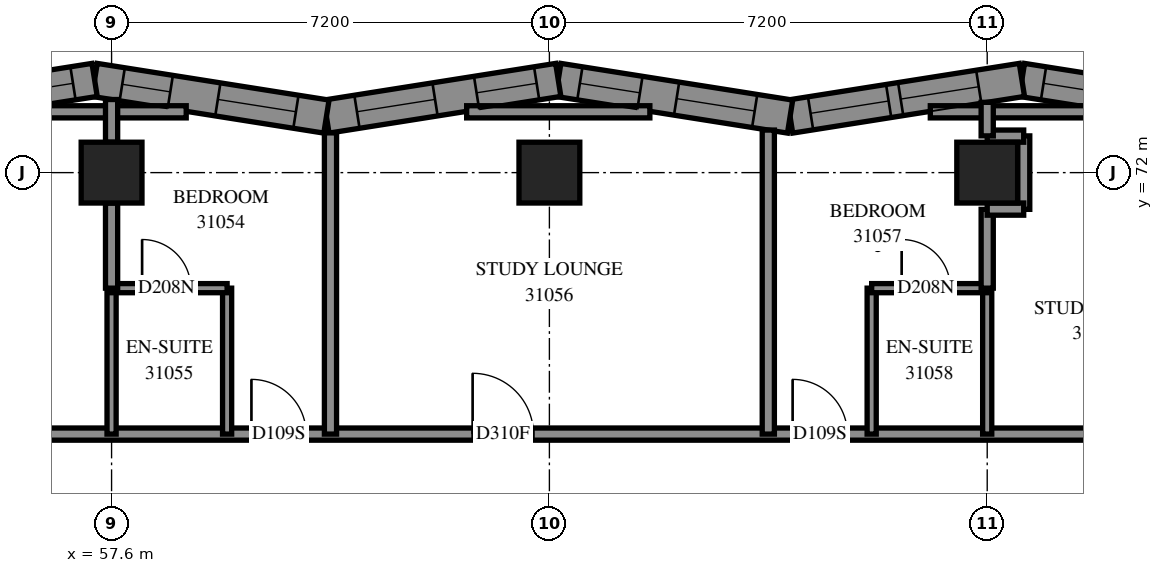
"""IFC4 building model, lengths in metres.
Left out: names, types, materials, properties, quantities, classifications, styles, units other than length and angle.
Written with IfcOpenShell. Run it as: python <this file> out.ifc"""

import sys

from ifc_helpers import new_model, si_unit, direction, frame, frame_2d, origin, origin_2d, place, context, subcontext, project, spatial, polyline, rectangle, outline, extrude, element, fill, save


model = new_model("IFC4")
c1 = context("Model", 3, precision=1e-05, world=origin(), true_north=direction((0.0, 1.0)))
c2 = subcontext(c1, "Body", "Model", "MODEL_VIEW")
j1 = project(units=[si_unit("LENGTHUNIT", "METRE"), si_unit("PLANEANGLEUNIT", "RADIAN")], contexts=[c1])
p1 = place(None, origin())
s1 = spatial("IfcSite", under=j1, at=p1, CompositionType="ELEMENT")
p2 = place(p1, origin())
s2 = spatial("IfcBuilding", under=s1, at=p2, CompositionType="ELEMENT")
p3 = place(p2, frame((0.0, 0.0, 115.2)))
s3 = spatial("IfcBuildingStorey", under=s2, at=p3, CompositionType="ELEMENT", Elevation=115.2)
for number, where, z_axis, x_axis in (
    (1, (57.6, 72.0, 0.0), (0.0, 0.0, 1.0), (1.0, 0.0, 0.0)),
    (2, (64.8, 72.0, 0.0), (0.0, 0.0, 1.0), (1.0, 0.0, 0.0)),
    (3, (72.0, 72.0, 0.0), (0.0, 0.0, 1.0), (1.0, 0.0, 0.0)),
):
    element("IfcColumn", number, at=place(p3, frame(where, z_axis=z_axis, x_axis=x_axis)), inside=s3, PredefinedType="COLUMN", context=c2, shape_type="SweptSolid", body=[
        extrude(rectangle(XDim=1.0, YDim=1.0, at=origin_2d()), origin(), (0.0, 0.0, 1.0), 3.1),
    ])
p4 = place(p3, frame((76.404, 72.918, 0.0), z_axis=(0.0, 0.0, 1.0), x_axis=(-0.9877221932, 0.1562205785, 0.0)))
e4 = element("IfcWall", 4, at=p4, inside=s3, PredefinedType="SOLIDWALL", context=c2, shape_type="SweptSolid", body=[
    extrude(outline(polyline([(0.065, -0.275), (3.925, -0.275), (3.838, 0.275), (-0.065, 0.275), (0.065, -0.275)])), origin(), (0.0, 0.0, 1.0), 3.1),
])
p5 = place(p4, frame((0.88, 0.0, 0.45)))
e5 = element("IfcOpeningElement", 5, at=p5, cuts=e4, PredefinedType="OPENING", context=c2, shape_type="SweptSolid", body=[
    extrude(rectangle(XDim=1.0, YDim=2.5, at=frame_2d((0.5, 1.25))), frame((0.0, 0.285, 0.0), z_axis=(0.0, -1.0, 0.0), x_axis=(1.0, 0.0, 0.0)), (0.0, 0.0, 1.0), 0.57),
])
p6 = place(p4, frame((2.521, 0.0, 0.45)))
e6 = element("IfcOpeningElement", 6, at=p6, cuts=e4, PredefinedType="OPENING", context=c2, shape_type="SweptSolid", body=[
    extrude(rectangle(XDim=1.0, YDim=2.5, at=frame_2d((0.5, 1.25))), frame((0.0, 0.285, 0.0), z_axis=(0.0, -1.0, 0.0), x_axis=(1.0, 0.0, 0.0)), (0.0, 0.0, 1.0), 0.57),
])
p7 = place(p3, frame((72.571, 73.525, 0.0), z_axis=(0.0, 0.0, 1.0), x_axis=(-0.9877213372, -0.1562259905, 0.0)))
e7 = element("IfcWall", 7, at=p7, inside=s3, PredefinedType="SOLIDWALL", context=c2, shape_type="SweptSolid", body=[
    extrude(outline(polyline([(-0.043, -0.275), (3.816, -0.275), (3.903, 0.275), (0.043, 0.275), (-0.043, -0.275)])), origin(), (0.0, 0.0, 1.0), 3.1),
])
p8 = place(p7, frame((0.719, 0.0, 0.5)))
e8 = element("IfcOpeningElement", 8, at=p8, cuts=e7, PredefinedType="OPENING", context=c2, shape_type="SweptSolid", body=[
    extrude(rectangle(XDim=1.3, YDim=2.45, at=frame_2d((0.65, 1.225))), frame((0.0, 0.285, 0.0), z_axis=(0.0, -1.0, 0.0), x_axis=(1.0, 0.0, 0.0)), (0.0, 0.0, 1.0), 0.57),
])
p9 = place(p7, frame((2.219, 0.0, 0.5)))
e9 = element("IfcOpeningElement", 9, at=p9, cuts=e7, PredefinedType="OPENING", context=c2, shape_type="SweptSolid", body=[
    extrude(rectangle(XDim=1.3, YDim=2.45, at=frame_2d((0.65, 1.225))), frame((0.0, 0.285, 0.0), z_axis=(0.0, -1.0, 0.0), x_axis=(1.0, 0.0, 0.0)), (0.0, 0.0, 1.0), 0.57),
])
p10 = place(p3, frame((68.758, 72.922, 0.0), z_axis=(0.0, 0.0, 1.0), x_axis=(-0.9877213372, 0.1562259905, 0.0)))
e10 = element("IfcWall", 10, at=p10, inside=s3, PredefinedType="SOLIDWALL", context=c2, shape_type="SweptSolid", body=[
    extrude(outline(polyline([(0.043, -0.275), (3.903, -0.275), (3.816, 0.275), (-0.043, 0.275), (0.043, -0.275)])), origin(), (0.0, 0.0, 1.0), 3.1),
])
p11 = place(p10, frame((0.59, 0.0, 0.5)))
e11 = element("IfcOpeningElement", 11, at=p11, cuts=e10, PredefinedType="OPENING", context=c2, shape_type="SweptSolid", body=[
    extrude(rectangle(XDim=1.3, YDim=2.45, at=frame_2d((0.65, 1.225))), frame((0.0, 0.285, 0.0), z_axis=(0.0, -1.0, 0.0), x_axis=(1.0, 0.0, 0.0)), (0.0, 0.0, 1.0), 0.57),
])
p12 = place(p10, frame((2.5, 0.0, 0.45)))
e12 = element("IfcOpeningElement", 12, at=p12, cuts=e10, PredefinedType="OPENING", context=c2, shape_type="SweptSolid", body=[
    extrude(rectangle(XDim=1.0, YDim=2.5, at=frame_2d((0.5, 1.25))), frame((0.0, 0.285, 0.0), z_axis=(0.0, -1.0, 0.0), x_axis=(1.0, 0.0, 0.0)), (0.0, 0.0, 1.0), 0.57),
])
p13 = place(p3, frame((64.946, 73.525, 0.0), z_axis=(0.0, 0.0, 1.0), x_axis=(-0.9877213372, -0.1562259905, 0.0)))
e13 = element("IfcWall", 13, at=p13, inside=s3, PredefinedType="SOLIDWALL", context=c2, shape_type="SweptSolid", body=[
    extrude(outline(polyline([(-0.043, -0.275), (3.816, -0.275), (3.903, 0.275), (0.043, 0.275), (-0.043, -0.275)])), origin(), (0.0, 0.0, 1.0), 3.1),
])
p14 = place(p13, frame((2.052, 0.0, 0.5)))
e14 = element("IfcOpeningElement", 14, at=p14, cuts=e13, PredefinedType="OPENING", context=c2, shape_type="SweptSolid", body=[
    extrude(rectangle(XDim=1.3, YDim=2.45, at=frame_2d((0.65, 1.225))), frame((0.0, 0.285, 0.0), z_axis=(0.0, -1.0, 0.0), x_axis=(1.0, 0.0, 0.0)), (0.0, 0.0, 1.0), 0.57),
])
p15 = place(p13, frame((0.36, 0.0, 0.45)))
e15 = element("IfcOpeningElement", 15, at=p15, cuts=e13, PredefinedType="OPENING", context=c2, shape_type="SweptSolid", body=[
    extrude(rectangle(XDim=1.0, YDim=2.5, at=frame_2d((0.5, 1.25))), frame((0.0, 0.285, 0.0), z_axis=(0.0, -1.0, 0.0), x_axis=(1.0, 0.0, 0.0)), (0.0, 0.0, 1.0), 0.57),
])
p16 = place(p3, frame((61.133, 72.922, 0.0), z_axis=(0.0, 0.0, 1.0), x_axis=(-0.9877213372, 0.1562259905, 0.0)))
e16 = element("IfcWall", 16, at=p16, inside=s3, PredefinedType="SOLIDWALL", context=c2, shape_type="SweptSolid", body=[
    extrude(outline(polyline([(0.043, -0.275), (3.903, -0.275), (3.816, 0.275), (-0.043, 0.275), (0.043, -0.275)])), origin(), (0.0, 0.0, 1.0), 3.1),
])
p17 = place(p16, frame((0.508, 0.0, 0.5)))
e17 = element("IfcOpeningElement", 17, at=p17, cuts=e16, PredefinedType="OPENING", context=c2, shape_type="SweptSolid", body=[
    extrude(rectangle(XDim=1.3, YDim=2.45, at=frame_2d((0.65, 1.225))), frame((0.0, 0.285, 0.0), z_axis=(0.0, -1.0, 0.0), x_axis=(1.0, 0.0, 0.0)), (0.0, 0.0, 1.0), 0.57),
])
p18 = place(p16, frame((2.6, 0.0, 0.45)))
e18 = element("IfcOpeningElement", 18, at=p18, cuts=e16, PredefinedType="OPENING", context=c2, shape_type="SweptSolid", body=[
    extrude(rectangle(XDim=0.8, YDim=2.5, at=frame_2d((0.4, 1.25))), frame((0.0, 0.285, 0.0), z_axis=(0.0, -1.0, 0.0), x_axis=(1.0, 0.0, 0.0)), (0.0, 0.0, 1.0), 0.57),
])
p19 = place(p3, frame((57.321, 73.525, 0.0), z_axis=(0.0, 0.0, 1.0), x_axis=(-0.9877213372, -0.1562259905, 0.0)))
e19 = element("IfcWall", 19, at=p19, inside=s3, PredefinedType="SOLIDWALL", context=c2, shape_type="SweptSolid", body=[
    extrude(outline(polyline([(-0.043, -0.275), (3.816, -0.275), (3.903, 0.275), (0.043, 0.275), (-0.043, -0.275)])), origin(), (0.0, 0.0, 1.0), 3.1),
])
p20 = place(p19, frame((1.903, 0.0, 0.5)))
e20 = element("IfcOpeningElement", 20, at=p20, cuts=e19, PredefinedType="OPENING", context=c2, shape_type="SweptSolid", body=[
    extrude(rectangle(XDim=1.3, YDim=2.45, at=frame_2d((0.65, 1.225))), frame((0.0, 0.285, 0.0), z_axis=(0.0, -1.0, 0.0), x_axis=(1.0, 0.0, 0.0)), (0.0, 0.0, 1.0), 0.57),
])
p21 = place(p19, frame((0.36, 0.0, 0.45)))
e21 = element("IfcOpeningElement", 21, at=p21, cuts=e19, PredefinedType="OPENING", context=c2, shape_type="SweptSolid", body=[
    extrude(rectangle(XDim=1.0, YDim=2.5, at=frame_2d((0.5, 1.25))), frame((0.0, 0.285, 0.0), z_axis=(0.0, -1.0, 0.0), x_axis=(1.0, 0.0, 0.0)), (0.0, 0.0, 1.0), 0.57),
])
p22 = place(p3, frame((54.7, 67.7, 0.0), z_axis=(0.0, 0.0, 1.0), x_axis=(1.0, 0.0, 0.0)))
e22 = element("IfcWall", 22, at=p22, inside=s3, PredefinedType="PARTITIONING", context=c2, shape_type="SweptSolid", body=[
    extrude(rectangle(XDim=20.2, YDim=0.2, at=frame_2d((10.1, 0.0))), origin(), (0.0, 0.0, 1.0), 3.1),
])
p23 = place(p22, frame((5.2, 0.0, 0.0)))
e23 = element("IfcOpeningElement", 23, at=p23, cuts=e22, PredefinedType="OPENING", context=c2, shape_type="SweptSolid", body=[
    extrude(rectangle(XDim=0.9, YDim=2.1, at=frame_2d((0.45, 1.05))), frame((0.0, 0.11, 0.0), z_axis=(0.0, -1.0, 0.0), x_axis=(1.0, 0.0, 0.0)), (0.0, 0.0, 1.0), 0.22),
])
p24 = place(p22, frame((8.838, 0.0, 0.0)))
e24 = element("IfcOpeningElement", 24, at=p24, cuts=e22, PredefinedType="OPENING", context=c2, shape_type="SweptSolid", body=[
    extrude(rectangle(XDim=1.0, YDim=2.1, at=frame_2d((0.5, 1.05))), frame((0.0, 0.11, 0.0), z_axis=(0.0, -1.0, 0.0), x_axis=(1.0, 0.0, 0.0)), (0.0, 0.0, 1.0), 0.22),
])
p25 = place(p22, frame((14.1, 0.0, 0.0)))
e25 = element("IfcOpeningElement", 25, at=p25, cuts=e22, PredefinedType="OPENING", context=c2, shape_type="SweptSolid", body=[
    extrude(rectangle(XDim=0.9, YDim=2.1, at=frame_2d((0.45, 1.05))), frame((0.0, 0.11, 0.0), z_axis=(0.0, -1.0, 0.0), x_axis=(1.0, 0.0, 0.0)), (0.0, 0.0, 1.0), 0.22),
])
p26 = place(p3, frame((68.4, 67.7, 0.0), z_axis=(0.0, 0.0, 1.0), x_axis=(0.0, 1.0, 0.0)))
e26 = element("IfcWall", 26, at=p26, inside=s3, PredefinedType="PARTITIONING", context=c2, shape_type="SweptSolid", body=[
    extrude(rectangle(XDim=5.0, YDim=0.2, at=frame_2d((2.5, 0.0))), origin(), (0.0, 0.0, 1.0), 3.1),
])
p27 = place(p3, frame((61.2, 67.7, 0.0), z_axis=(0.0, 0.0, 1.0), x_axis=(0.0, 1.0, 0.0)))
e27 = element("IfcWall", 27, at=p27, inside=s3, PredefinedType="PARTITIONING", context=c2, shape_type="SweptSolid", body=[
    extrude(rectangle(XDim=4.954, YDim=0.2, at=frame_2d((2.477, 0.0))), origin(), (0.0, 0.0, 1.0), 3.1),
])
for number, where, z_axis, x_axis in (
    (28, (71.064, 73.0, 0.0), (0.0, 0.0, 1.0), (1.0, 0.0, 0.0)),
    (29, (55.815, 73.0, 0.0), (0.0, 0.0, 1.0), (1.0, 0.0, 0.0)),
    (30, (63.44, 73.0, 0.0), (0.0, 0.0, 1.0), (1.0, 0.0, 0.0)),
):
    element("IfcWall", number, at=place(p3, frame(where, z_axis=z_axis, x_axis=x_axis)), inside=s3, PredefinedType="PARTITIONING", context=c2, shape_type="SweptSolid", body=[
        extrude(rectangle(XDim=3.013, YDim=0.2, at=frame_2d((1.506, 0.0))), origin(), (0.0, 0.0, 1.0), 3.1),
    ])
for number, where, z_axis, x_axis in (
    (31, (59.5, 67.7, 0.0), (0.0, 0.0, 1.0), (0.0, 1.0, 0.0)),
    (32, (57.6, 67.7, 0.0), (0.0, 0.0, 1.0), (0.0, 1.0, 0.0)),
    (33, (70.1, 67.7, 0.0), (0.0, 0.0, 1.0), (0.0, 1.0, 0.0)),
    (34, (72.0, 67.7, 0.0), (0.0, 0.0, 1.0), (0.0, 1.0, 0.0)),
):
    element("IfcWall", number, at=place(p3, frame(where, z_axis=z_axis, x_axis=x_axis)), inside=s3, PredefinedType="PARTITIONING", context=c2, shape_type="SweptSolid", body=[
        extrude(rectangle(XDim=2.4, YDim=0.15, at=frame_2d((1.2, 0.0))), origin(), (0.0, 0.0, 1.0), 3.1),
    ])
p28 = place(p3, frame((70.1, 70.1, 0.0), z_axis=(0.0, 0.0, 1.0), x_axis=(1.0, 0.0, 0.0)))
e35 = element("IfcWall", 35, at=p28, inside=s3, PredefinedType="PARTITIONING", context=c2, shape_type="SweptSolid", body=[
    extrude(rectangle(XDim=1.9, YDim=0.15, at=frame_2d((0.95, 0.0))), origin(), (0.0, 0.0, 1.0), 3.1),
])
p29 = place(p28, frame((0.493, 0.0, 0.0)))
e36 = element("IfcOpeningElement", 36, at=p29, cuts=e35, PredefinedType="OPENING", context=c2, shape_type="SweptSolid", body=[
    extrude(rectangle(XDim=0.8, YDim=2.1, at=frame_2d((0.4, 1.05))), frame((0.0, 0.085, 0.0), z_axis=(0.0, -1.0, 0.0), x_axis=(1.0, 0.0, 0.0)), (0.0, 0.0, 1.0), 0.17),
])
p30 = place(p3, frame((57.6, 70.1, 0.0), z_axis=(0.0, 0.0, 1.0), x_axis=(1.0, 0.0, 0.0)))
e37 = element("IfcWall", 37, at=p30, inside=s3, PredefinedType="PARTITIONING", context=c2, shape_type="SweptSolid", body=[
    extrude(rectangle(XDim=1.9, YDim=0.15, at=frame_2d((0.95, 0.0))), origin(), (0.0, 0.0, 1.0), 3.1),
])
p31 = place(p30, frame((0.502, 0.0, 0.0)))
e38 = element("IfcOpeningElement", 38, at=p31, cuts=e37, PredefinedType="OPENING", context=c2, shape_type="SweptSolid", body=[
    extrude(rectangle(XDim=0.8, YDim=2.1, at=frame_2d((0.4, 1.05))), frame((0.0, 0.085, 0.0), z_axis=(0.0, -1.0, 0.0), x_axis=(1.0, 0.0, 0.0)), (0.0, 0.0, 1.0), 0.17),
])
p32 = place(p3, frame((57.6, 70.1, 0.0), z_axis=(0.0, 0.0, 1.0), x_axis=(0.0, 1.0, 0.0)))
e39 = element("IfcWall", 39, at=p32, inside=s3, PredefinedType="PARTITIONING", context=c2, shape_type="SweptSolid", body=[
    extrude(rectangle(XDim=1.4, YDim=0.2, at=frame_2d((0.7, 0.0))), origin(), (0.0, 0.0, 1.0), 3.1),
])
p33 = place(p3, frame((72.0, 70.1, 0.0), z_axis=(0.0, 0.0, 1.0), x_axis=(0.0, 1.0, 0.0)))
e40 = element("IfcWall", 40, at=p33, inside=s3, PredefinedType="PARTITIONING", context=c2, shape_type="SweptSolid", body=[
    extrude(rectangle(XDim=1.296, YDim=0.2, at=frame_2d((0.648, 0.0))), origin(), (0.0, 0.0, 1.0), 3.1),
])
p34 = place(p3, frame((72.6, 71.396, 0.0), z_axis=(0.0, 0.0, 1.0), x_axis=(0.0, 1.0, 0.0)))
e41 = element("IfcWall", 41, at=p34, inside=s3, PredefinedType="PARTITIONING", context=c2, shape_type="SweptSolid", body=[
    extrude(rectangle(XDim=1.208, YDim=0.2, at=frame_2d((0.604, 0.0))), origin(), (0.0, 0.0, 1.0), 3.1),
])
for number, where, z_axis, x_axis in (
    (42, (72.0, 72.6, 0.0), (0.0, 0.0, 1.0), (1.0, 0.0, 0.0)),
    (43, (72.0, 71.4, 0.0), (0.0, 0.0, 1.0), (1.0, 0.0, 0.0)),
):
    element("IfcWall", number, at=place(p3, frame(where, z_axis=z_axis, x_axis=x_axis)), inside=s3, PredefinedType="PARTITIONING", context=c2, shape_type="SweptSolid", body=[
        extrude(rectangle(XDim=0.6, YDim=0.2, at=frame_2d((0.3, 0.0))), origin(), (0.0, 0.0, 1.0), 3.1),
    ])
p35 = place(p3, frame((57.6, 72.5, 0.0), z_axis=(0.0, 0.0, 1.0), x_axis=(0.0, 1.0, 0.0)))
e44 = element("IfcWall", 44, at=p35, inside=s3, PredefinedType="PARTITIONING", context=c2, shape_type="SweptSolid", body=[
    extrude(rectangle(XDim=0.702, YDim=0.2, at=frame_2d((0.351, 0.0))), origin(), (0.0, 0.0, 1.0), 3.1),
])
p36 = place(p3, frame((72.0, 72.604, 0.0), z_axis=(0.0, 0.0, 1.0), x_axis=(0.0, 1.0, 0.0)))
e45 = element("IfcWall", 45, at=p36, inside=s3, PredefinedType="PARTITIONING", context=c2, shape_type="SweptSolid", body=[
    extrude(rectangle(XDim=0.552, YDim=0.2, at=frame_2d((0.276, 0.0))), origin(), (0.0, 0.0, 1.0), 3.1),
])
p37 = place(p8, origin())
e46 = element("IfcWindow", 46, at=p37, inside=s3, PartitioningType="SINGLE_PANEL", PredefinedType="WINDOW", context=c2, shape_type="SweptSolid", body=[
    extrude(rectangle(XDim=1.3, YDim=2.45, at=frame_2d((0.65, 1.225))), frame((0.0, 0.145, 0.0), z_axis=(0.0, -1.0, 0.0), x_axis=(1.0, 0.0, 0.0)), (0.0, 0.0, 1.0), 0.06),
])
fill(e8, e46)
p38 = place(p9, origin())
e47 = element("IfcWindow", 47, at=p38, inside=s3, PartitioningType="SINGLE_PANEL", PredefinedType="WINDOW", context=c2, shape_type="SweptSolid", body=[
    extrude(rectangle(XDim=1.3, YDim=2.45, at=frame_2d((0.65, 1.225))), frame((0.0, 0.155, 0.0), z_axis=(0.0, -1.0, 0.0), x_axis=(1.0, 0.0, 0.0)), (0.0, 0.0, 1.0), 0.06),
])
fill(e9, e47)
p39 = place(p11, origin())
e48 = element("IfcWindow", 48, at=p39, inside=s3, PartitioningType="SINGLE_PANEL", PredefinedType="WINDOW", context=c2, shape_type="SweptSolid", body=[
    extrude(rectangle(XDim=1.3, YDim=2.45, at=frame_2d((0.65, 1.225))), frame((0.0, 0.155, 0.0), z_axis=(0.0, -1.0, 0.0), x_axis=(1.0, 0.0, 0.0)), (0.0, 0.0, 1.0), 0.06),
])
fill(e11, e48)
p40 = place(p14, origin())
e49 = element("IfcWindow", 49, at=p40, inside=s3, PartitioningType="SINGLE_PANEL", PredefinedType="WINDOW", context=c2, shape_type="SweptSolid", body=[
    extrude(rectangle(XDim=1.3, YDim=2.45, at=frame_2d((0.65, 1.225))), frame((0.0, 0.155, 0.0), z_axis=(0.0, -1.0, 0.0), x_axis=(1.0, 0.0, 0.0)), (0.0, 0.0, 1.0), 0.06),
])
fill(e14, e49)
p41 = place(p17, origin())
e50 = element("IfcWindow", 50, at=p41, inside=s3, PartitioningType="SINGLE_PANEL", PredefinedType="WINDOW", context=c2, shape_type="SweptSolid", body=[
    extrude(rectangle(XDim=1.3, YDim=2.45, at=frame_2d((0.65, 1.225))), frame((0.0, 0.155, 0.0), z_axis=(0.0, -1.0, 0.0), x_axis=(1.0, 0.0, 0.0)), (0.0, 0.0, 1.0), 0.06),
])
fill(e17, e50)
p42 = place(p23, origin())
e51 = element("IfcDoor", 51, at=p42, inside=s3, OperationType="SINGLE_SWING_RIGHT", PredefinedType="DOOR", context=c2, shape_type="SweptSolid", body=[
    extrude(rectangle(XDim=0.9, YDim=2.1, at=frame_2d((0.45, 1.05))), frame((0.0, 0.025, 0.0), z_axis=(0.0, -1.0, 0.0), x_axis=(1.0, 0.0, 0.0)), (0.0, 0.0, 1.0), 0.05),
])
fill(e23, e51)
p43 = place(p31, origin())
e52 = element("IfcDoor", 52, at=p43, inside=s3, OperationType="SINGLE_SWING_RIGHT", PredefinedType="DOOR", context=c2, shape_type="SweptSolid", body=[
    extrude(rectangle(XDim=0.8, YDim=2.1, at=frame_2d((0.4, 1.05))), frame((0.0, 0.025, 0.0), z_axis=(0.0, -1.0, 0.0), x_axis=(1.0, 0.0, 0.0)), (0.0, 0.0, 1.0), 0.05),
])
fill(e38, e52)
p44 = place(p24, origin())
e53 = element("IfcDoor", 53, at=p44, inside=s3, OperationType="SINGLE_SWING_LEFT", PredefinedType="DOOR", context=c2, shape_type="SweptSolid", body=[
    extrude(rectangle(XDim=1.0, YDim=2.1, at=frame_2d((0.5, 1.05))), frame((0.0, 0.025, 0.0), z_axis=(0.0, -1.0, 0.0), x_axis=(1.0, 0.0, 0.0)), (0.0, 0.0, 1.0), 0.05),
])
fill(e24, e53)
p45 = place(p25, origin())
e54 = element("IfcDoor", 54, at=p45, inside=s3, OperationType="SINGLE_SWING_LEFT", PredefinedType="DOOR", context=c2, shape_type="SweptSolid", body=[
    extrude(rectangle(XDim=0.9, YDim=2.1, at=frame_2d((0.45, 1.05))), frame((0.0, 0.025, 0.0), z_axis=(0.0, -1.0, 0.0), x_axis=(1.0, 0.0, 0.0)), (0.0, 0.0, 1.0), 0.05),
])
fill(e25, e54)
p46 = place(p29, origin())
e55 = element("IfcDoor", 55, at=p46, inside=s3, OperationType="SINGLE_SWING_RIGHT", PredefinedType="DOOR", context=c2, shape_type="SweptSolid", body=[
    extrude(rectangle(XDim=0.8, YDim=2.1, at=frame_2d((0.4, 1.05))), frame((0.0, 0.025, 0.0), z_axis=(0.0, -1.0, 0.0), x_axis=(1.0, 0.0, 0.0)), (0.0, 0.0, 1.0), 0.05),
])
fill(e36, e55)
p47 = place(p6, origin())
e56 = element("IfcWindow", 56, at=p47, inside=s3, PartitioningType="SINGLE_PANEL", PredefinedType="WINDOW", context=c2, shape_type="SweptSolid", body=[
    extrude(rectangle(XDim=1.0, YDim=2.5, at=frame_2d((0.5, 1.25))), frame((0.0, 0.155, 0.0), z_axis=(0.0, -1.0, 0.0), x_axis=(1.0, 0.0, 0.0)), (0.0, 0.0, 1.0), 0.06),
])
fill(e6, e56)
p48 = place(p12, origin())
e57 = element("IfcWindow", 57, at=p48, inside=s3, PartitioningType="SINGLE_PANEL", PredefinedType="WINDOW", context=c2, shape_type="SweptSolid", body=[
    extrude(rectangle(XDim=1.0, YDim=2.5, at=frame_2d((0.5, 1.25))), frame((0.0, 0.155, 0.0), z_axis=(0.0, -1.0, 0.0), x_axis=(1.0, 0.0, 0.0)), (0.0, 0.0, 1.0), 0.06),
])
fill(e12, e57)
p49 = place(p15, origin())
e58 = element("IfcWindow", 58, at=p49, inside=s3, PartitioningType="SINGLE_PANEL", PredefinedType="WINDOW", context=c2, shape_type="SweptSolid", body=[
    extrude(rectangle(XDim=1.0, YDim=2.5, at=frame_2d((0.5, 1.25))), frame((0.0, 0.155, 0.0), z_axis=(0.0, -1.0, 0.0), x_axis=(1.0, 0.0, 0.0)), (0.0, 0.0, 1.0), 0.06),
])
fill(e15, e58)
p50 = place(p18, origin())
e59 = element("IfcWindow", 59, at=p50, inside=s3, PartitioningType="SINGLE_PANEL", PredefinedType="WINDOW", context=c2, shape_type="SweptSolid", body=[
    extrude(rectangle(XDim=0.8, YDim=2.5, at=frame_2d((0.4, 1.25))), frame((0.0, 0.155, 0.0), z_axis=(0.0, -1.0, 0.0), x_axis=(1.0, 0.0, 0.0)), (0.0, 0.0, 1.0), 0.06),
])
fill(e18, e59)
p51 = place(p21, origin())
e60 = element("IfcWindow", 60, at=p51, inside=s3, PartitioningType="SINGLE_PANEL", PredefinedType="WINDOW", context=c2, shape_type="SweptSolid", body=[
    extrude(rectangle(XDim=1.0, YDim=2.5, at=frame_2d((0.5, 1.25))), frame((0.0, 0.155, 0.0), z_axis=(0.0, -1.0, 0.0), x_axis=(1.0, 0.0, 0.0)), (0.0, 0.0, 1.0), 0.06),
])
fill(e21, e60)
save(model, sys.argv[1])
